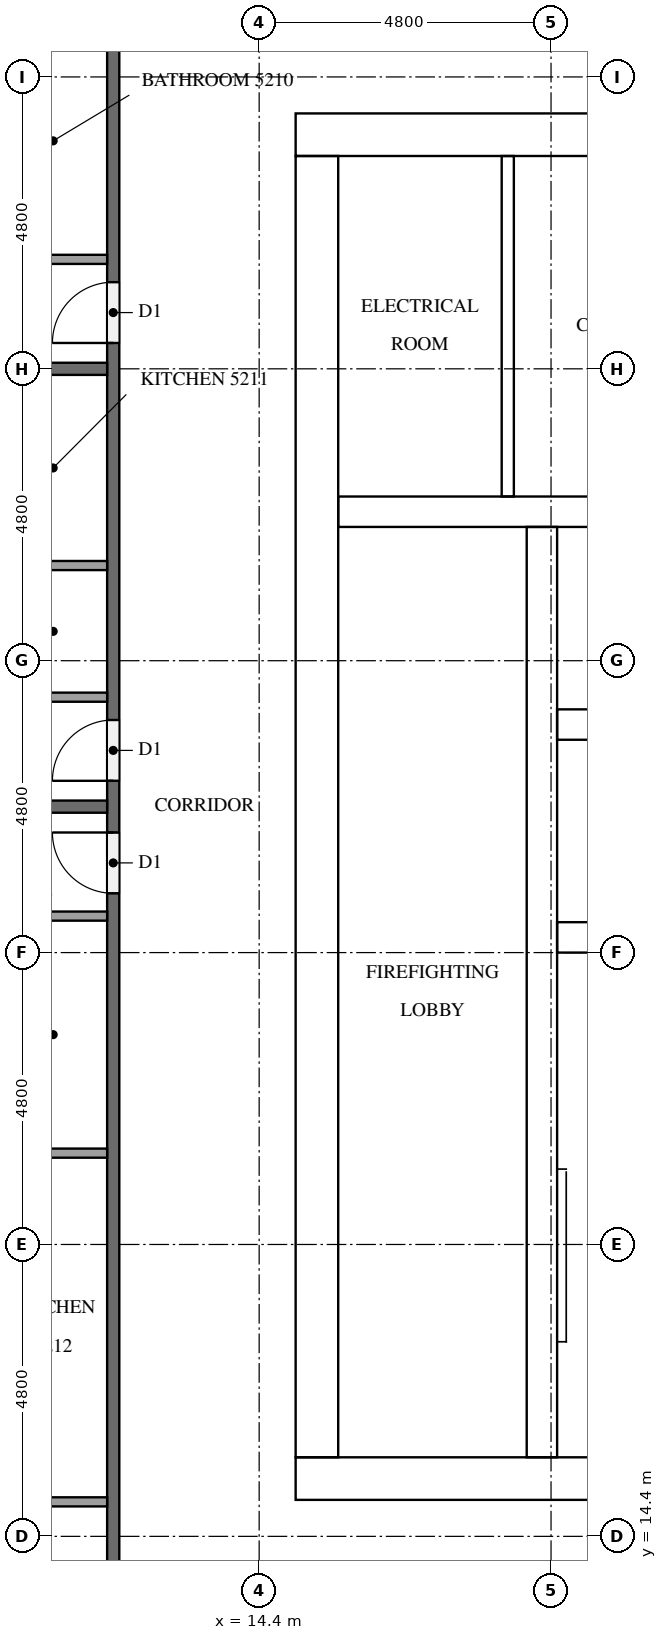
"""IFC4 building model, lengths in metres.
Left out: names, types, materials, properties, quantities, classifications, styles, units other than length and angle.
Written with IfcOpenShell. Run it as: python <this file> out.ifc"""

import sys

from ifc_helpers import new_model, si_unit, direction, frame, frame_2d, origin, place, context, subcontext, project, spatial, rectangle, extrude, element, fill, save


model = new_model("IFC4")
c1 = context("Model", 3, precision=1e-05, world=origin(), true_north=direction((0.0, 1.0)))
c2 = subcontext(c1, "Body", "Model", "MODEL_VIEW")
j1 = project(units=[si_unit("LENGTHUNIT", "METRE"), si_unit("PLANEANGLEUNIT", "RADIAN")], contexts=[c1])
p1 = place(None, origin())
s1 = spatial("IfcSite", under=j1, at=p1, CompositionType="ELEMENT")
p2 = place(p1, origin())
s2 = spatial("IfcBuilding", under=s1, at=p2, CompositionType="ELEMENT")
p3 = place(p2, frame((0.0, 0.0, 199.9)))
s3 = spatial("IfcBuildingStorey", under=s2, at=p3, CompositionType="ELEMENT", Elevation=199.9)
p4 = place(p3, frame((15.0, 15.35, 0.0), z_axis=(0.0, 0.0, 1.0), x_axis=(1.0, 0.0, 0.0)))
e1 = element("IfcWall", 1, at=p4, inside=s3, PredefinedType="SHEAR", context=c2, shape_type="SweptSolid", body=[
    extrude(rectangle(XDim=32.4, YDim=0.7, at=frame_2d((16.2, 0.0))), origin(), (0.0, 0.0, 1.0), 3.1),
])
p5 = place(p4, frame((15.3, 0.0, 0.0)))
e2 = element("IfcOpeningElement", 2, at=p5, cuts=e1, PredefinedType="OPENING", context=c2, shape_type="SweptSolid", body=[
    extrude(rectangle(XDim=1.8, YDim=2.1, at=frame_2d((0.9, 1.05))), frame((0.0, 0.36, 0.0), z_axis=(0.0, -1.0, 0.0), x_axis=(1.0, 0.0, 0.0)), (0.0, 0.0, 1.0), 0.72),
])
p6 = place(p3, frame((15.0, 37.45, 0.0), z_axis=(0.0, 0.0, 1.0), x_axis=(1.0, 0.0, 0.0)))
e3 = element("IfcWall", 3, at=p6, inside=s3, PredefinedType="SHEAR", context=c2, shape_type="SweptSolid", body=[
    extrude(rectangle(XDim=32.4, YDim=0.7, at=frame_2d((16.2, 0.0))), origin(), (0.0, 0.0, 1.0), 3.1),
])
p7 = place(p6, frame((15.3, 0.0, 0.0)))
e4 = element("IfcOpeningElement", 4, at=p7, cuts=e3, PredefinedType="OPENING", context=c2, shape_type="SweptSolid", body=[
    extrude(rectangle(XDim=1.8, YDim=2.1, at=frame_2d((0.9, 1.05))), frame((0.0, 0.36, 0.0), z_axis=(0.0, -1.0, 0.0), x_axis=(1.0, 0.0, 0.0)), (0.0, 0.0, 1.0), 0.72),
])
p8 = place(p6, frame((1.544, 0.0, 0.0)))
e5 = element("IfcOpeningElement", 5, at=p8, cuts=e3, PredefinedType="OPENING", context=c2, shape_type="SweptSolid", body=[
    extrude(rectangle(XDim=1.0, YDim=2.1, at=frame_2d((0.5, 1.05))), frame((0.0, 0.36, 0.0), z_axis=(0.0, -1.0, 0.0), x_axis=(1.0, 0.0, 0.0)), (0.0, 0.0, 1.0), 0.72),
])
p9 = place(p6, frame((5.219, 0.0, 0.0)))
e6 = element("IfcOpeningElement", 6, at=p9, cuts=e3, PredefinedType="OPENING", context=c2, shape_type="SweptSolid", body=[
    extrude(rectangle(XDim=1.0, YDim=2.1, at=frame_2d((0.5, 1.05))), frame((0.0, 0.36, 0.0), z_axis=(0.0, -1.0, 0.0), x_axis=(1.0, 0.0, 0.0)), (0.0, 0.0, 1.0), 0.72),
])
p10 = place(p3, frame((15.35, 15.7, 0.0), z_axis=(0.0, 0.0, 1.0), x_axis=(0.0, 1.0, 0.0)))
e7 = element("IfcWall", 7, at=p10, inside=s3, PredefinedType="SHEAR", context=c2, shape_type="SweptSolid", body=[
    extrude(rectangle(XDim=21.4, YDim=0.7, at=frame_2d((10.7, 0.0))), origin(), (0.0, 0.0, 1.0), 3.1),
])
p11 = place(p10, frame((5.06, 0.0, 0.0)))
e8 = element("IfcOpeningElement", 8, at=p11, cuts=e7, PredefinedType="OPENING", context=c2, shape_type="SweptSolid", body=[
    extrude(rectangle(XDim=1.2, YDim=2.1, at=frame_2d((0.6, 1.05))), frame((0.0, 0.36, 0.0), z_axis=(0.0, -1.0, 0.0), x_axis=(1.0, 0.0, 0.0)), (0.0, 0.0, 1.0), 0.72),
])
p12 = place(p3, frame((19.05, 15.7, 0.0), z_axis=(0.0, 0.0, 1.0), x_axis=(0.0, 1.0, 0.0)))
e9 = element("IfcWall", 9, at=p12, inside=s3, PredefinedType="SHEAR", context=c2, shape_type="SweptSolid", body=[
    extrude(rectangle(XDim=15.3, YDim=0.5, at=frame_2d((7.65, 0.0))), origin(), (0.0, 0.0, 1.0), 3.1),
])
p13 = place(p12, frame((9.75, 0.0, 0.0)))
e10 = element("IfcOpeningElement", 10, at=p13, cuts=e9, PredefinedType="OPENING", context=c2, shape_type="SweptSolid", body=[
    extrude(rectangle(XDim=1.1, YDim=2.1, at=frame_2d((0.55, 1.05))), frame((0.0, 0.26, 0.0), z_axis=(0.0, -1.0, 0.0), x_axis=(1.0, 0.0, 0.0)), (0.0, 0.0, 1.0), 0.52),
])
p14 = place(p12, frame((13.25, 0.0, 0.0)))
e11 = element("IfcOpeningElement", 11, at=p14, cuts=e9, PredefinedType="OPENING", context=c2, shape_type="SweptSolid", body=[
    extrude(rectangle(XDim=1.1, YDim=2.1, at=frame_2d((0.55, 1.05))), frame((0.0, 0.26, 0.0), z_axis=(0.0, -1.0, 0.0), x_axis=(1.0, 0.0, 0.0)), (0.0, 0.0, 1.0), 0.52),
])
p15 = place(p12, frame((0.5, 0.0, 0.0)))
e12 = element("IfcOpeningElement", 12, at=p15, cuts=e9, PredefinedType="OPENING", context=c2, shape_type="SweptSolid", body=[
    extrude(rectangle(XDim=1.2, YDim=2.1, at=frame_2d((0.6, 1.05))), frame((0.0, 0.26, 0.0), z_axis=(0.0, -1.0, 0.0), x_axis=(1.0, 0.0, 0.0)), (0.0, 0.0, 1.0), 0.52),
])
for number, where, z_axis, x_axis in (
    (13, (19.3, 24.25, 0.0), (0.0, 0.0, 1.0), (1.0, 0.0, 0.0)),
    (14, (19.3, 27.75, 0.0), (0.0, 0.0, 1.0), (1.0, 0.0, 0.0)),
):
    element("IfcWall", number, at=place(p3, frame(where, z_axis=z_axis, x_axis=x_axis)), inside=s3, PredefinedType="SHEAR", context=c2, shape_type="SweptSolid", body=[
        extrude(rectangle(XDim=3.55, YDim=0.5, at=frame_2d((1.775, 0.0))), origin(), (0.0, 0.0, 1.0), 3.1),
    ])
p16 = place(p3, frame((15.7, 31.25, 0.0), z_axis=(0.0, 0.0, 1.0), x_axis=(1.0, 0.0, 0.0)))
e15 = element("IfcWall", 15, at=p16, inside=s3, PredefinedType="SHEAR", context=c2, shape_type="SweptSolid", body=[
    extrude(rectangle(XDim=7.15, YDim=0.5, at=frame_2d((3.575, 0.0))), origin(), (0.0, 0.0, 1.0), 3.1),
])
p17 = place(p3, frame((18.489, 31.5, 0.0), z_axis=(0.0, 0.0, 1.0), x_axis=(0.0, 1.0, 0.0)))
e16 = element("IfcWall", 16, at=p17, inside=s3, PredefinedType="PARTITIONING", context=c2, shape_type="SweptSolid", body=[
    extrude(rectangle(XDim=5.6, YDim=0.2, at=frame_2d((2.8, 0.0))), origin(), (0.0, 0.0, 1.0), 3.1),
])
p18 = place(p3, frame((12.0, 12.1, 0.0), z_axis=(0.0, 0.0, 1.0), x_axis=(0.0, 1.0, 0.0)))
e17 = element("IfcWall", 17, at=p18, inside=s3, PredefinedType="PARTITIONING", context=c2, shape_type="SweptSolid", body=[
    extrude(rectangle(XDim=28.6, YDim=0.2, at=frame_2d((14.3, 0.0))), origin(), (0.0, 0.0, 1.0), 3.1),
])
p19 = place(p18, frame((21.925, 0.0, 0.0)))
e18 = element("IfcOpeningElement", 18, at=p19, cuts=e17, PredefinedType="OPENING", context=c2, shape_type="SweptSolid", body=[
    extrude(rectangle(XDim=1.0, YDim=2.1, at=frame_2d((0.5, 1.05))), frame((0.0, 0.11, 0.0), z_axis=(0.0, -1.0, 0.0), x_axis=(1.0, 0.0, 0.0)), (0.0, 0.0, 1.0), 0.22),
])
p20 = place(p18, frame((14.725, 0.0, 0.0)))
e19 = element("IfcOpeningElement", 19, at=p20, cuts=e17, PredefinedType="OPENING", context=c2, shape_type="SweptSolid", body=[
    extrude(rectangle(XDim=1.0, YDim=2.1, at=frame_2d((0.5, 1.05))), frame((0.0, 0.11, 0.0), z_axis=(0.0, -1.0, 0.0), x_axis=(1.0, 0.0, 0.0)), (0.0, 0.0, 1.0), 0.22),
])
p21 = place(p18, frame((12.875, 0.0, 0.0)))
e20 = element("IfcOpeningElement", 20, at=p21, cuts=e17, PredefinedType="OPENING", context=c2, shape_type="SweptSolid", body=[
    extrude(rectangle(XDim=1.0, YDim=2.1, at=frame_2d((0.5, 1.05))), frame((0.0, 0.11, 0.0), z_axis=(0.0, -1.0, 0.0), x_axis=(1.0, 0.0, 0.0)), (0.0, 0.0, 1.0), 0.22),
])
p22 = place(p3, frame((5.125, 33.6, 0.0), z_axis=(0.0, 0.0, 1.0), x_axis=(1.0, 0.0, 0.0)))
e21 = element("IfcWall", 21, at=p22, inside=s3, PredefinedType="PARTITIONING", context=c2, shape_type="SweptSolid", body=[
    extrude(rectangle(XDim=6.775, YDim=0.2, at=frame_2d((3.387, 0.0))), origin(), (0.0, 0.0, 1.0), 3.1),
])
p23 = place(p3, frame((4.9, 26.4, 0.0), z_axis=(0.0, 0.0, 1.0), x_axis=(1.0, 0.0, 0.0)))
e22 = element("IfcWall", 22, at=p23, inside=s3, PredefinedType="PARTITIONING", context=c2, shape_type="SweptSolid", body=[
    extrude(rectangle(XDim=7.0, YDim=0.2, at=frame_2d((3.5, 0.0))), origin(), (0.0, 0.0, 1.0), 3.1),
])
p24 = place(p3, frame((11.9, 35.4, 0.0), z_axis=(0.0, 0.0, 1.0), x_axis=(-1.0, 0.0, 0.0)))
e23 = element("IfcWall", 23, at=p24, inside=s3, PredefinedType="PARTITIONING", context=c2, shape_type="SweptSolid", body=[
    extrude(rectangle(XDim=1.925, YDim=0.15, at=frame_2d((0.962, 0.0))), origin(), (0.0, 0.0, 1.0), 3.1),
])
p25 = place(p3, frame((11.9, 30.365, 0.0), z_axis=(0.0, 0.0, 1.0), x_axis=(-1.0, 0.0, 0.0)))
e24 = element("IfcWall", 24, at=p25, inside=s3, PredefinedType="PARTITIONING", context=c2, shape_type="SweptSolid", body=[
    extrude(rectangle(XDim=1.775, YDim=0.15, at=frame_2d((0.887, 0.0))), origin(), (0.0, 0.0, 1.0), 3.1),
])
p26 = place(p3, frame((11.9, 28.2, 0.0), z_axis=(0.0, 0.0, 1.0), x_axis=(-1.0, 0.0, 0.0)))
e25 = element("IfcWall", 25, at=p26, inside=s3, PredefinedType="PARTITIONING", context=c2, shape_type="SweptSolid", body=[
    extrude(rectangle(XDim=1.925, YDim=0.15, at=frame_2d((0.962, 0.0))), origin(), (0.0, 0.0, 1.0), 3.1),
])
for number, where, z_axis, x_axis in (
    (26, (11.9, 20.702, 0.0), (0.0, 0.0, 1.0), (-1.0, 0.0, 0.0)),
    (27, (11.9, 14.967, 0.0), (0.0, 0.0, 1.0), (-1.0, 0.0, 0.0)),
):
    element("IfcWall", number, at=place(p3, frame(where, z_axis=z_axis, x_axis=x_axis)), inside=s3, PredefinedType="PARTITIONING", context=c2, shape_type="SweptSolid", body=[
        extrude(rectangle(XDim=1.775, YDim=0.15, at=frame_2d((0.887, 0.0))), origin(), (0.0, 0.0, 1.0), 3.1),
    ])
p27 = place(p3, frame((11.9, 24.6, 0.0), z_axis=(0.0, 0.0, 1.0), x_axis=(-1.0, 0.0, 0.0)))
e28 = element("IfcWall", 28, at=p27, inside=s3, PredefinedType="PARTITIONING", context=c2, shape_type="SweptSolid", body=[
    extrude(rectangle(XDim=1.925, YDim=0.15, at=frame_2d((0.962, 0.0))), origin(), (0.0, 0.0, 1.0), 3.1),
])
p28 = place(p13, origin())
e29 = element("IfcDoor", 29, at=p28, inside=s3, OperationType="DOUBLE_DOOR_SLIDING", PredefinedType="DOOR", context=c2, shape_type="SweptSolid", body=[
    extrude(rectangle(XDim=1.1, YDim=2.1, at=frame_2d((0.55, 1.05))), frame((0.0, 0.025, 0.0), z_axis=(0.0, -1.0, 0.0), x_axis=(1.0, 0.0, 0.0)), (0.0, 0.0, 1.0), 0.05),
])
fill(e10, e29)
p29 = place(p14, origin())
e30 = element("IfcDoor", 30, at=p29, inside=s3, OperationType="DOUBLE_DOOR_SLIDING", PredefinedType="DOOR", context=c2, shape_type="SweptSolid", body=[
    extrude(rectangle(XDim=1.1, YDim=2.1, at=frame_2d((0.55, 1.05))), frame((0.0, 0.025, 0.0), z_axis=(0.0, -1.0, 0.0), x_axis=(1.0, 0.0, 0.0)), (0.0, 0.0, 1.0), 0.05),
])
fill(e11, e30)
p30 = place(p15, frame((1.2, 0.0, 0.0), z_axis=(0.0, 0.0, 1.0), x_axis=(-1.0, 0.0, 0.0)))
e31 = element("IfcDoor", 31, at=p30, inside=s3, OperationType="SINGLE_SWING_RIGHT", PredefinedType="DOOR", context=c2, shape_type="SweptSolid", body=[
    extrude(rectangle(XDim=1.2, YDim=2.1, at=frame_2d((0.6, 1.05))), frame((0.0, 0.025, 0.0), z_axis=(0.0, -1.0, 0.0), x_axis=(1.0, 0.0, 0.0)), (0.0, 0.0, 1.0), 0.05),
])
fill(e12, e31)
p31 = place(p11, frame((1.2, 0.0, 0.0), z_axis=(0.0, 0.0, 1.0), x_axis=(-1.0, 0.0, 0.0)))
e32 = element("IfcDoor", 32, at=p31, inside=s3, OperationType="SINGLE_SWING_LEFT", PredefinedType="DOOR", context=c2, shape_type="SweptSolid", body=[
    extrude(rectangle(XDim=1.2, YDim=2.1, at=frame_2d((0.6, 1.05))), frame((0.0, 0.025, 0.0), z_axis=(0.0, -1.0, 0.0), x_axis=(1.0, 0.0, 0.0)), (0.0, 0.0, 1.0), 0.05),
])
fill(e8, e32)
p32 = place(p8, origin())
e33 = element("IfcDoor", 33, at=p32, inside=s3, OperationType="SINGLE_SWING_LEFT", PredefinedType="DOOR", context=c2, shape_type="SweptSolid", body=[
    extrude(rectangle(XDim=1.0, YDim=2.1, at=frame_2d((0.5, 1.05))), frame((0.0, 0.025, 0.0), z_axis=(0.0, -1.0, 0.0), x_axis=(1.0, 0.0, 0.0)), (0.0, 0.0, 1.0), 0.05),
])
fill(e5, e33)
p33 = place(p19, origin())
e34 = element("IfcDoor", 34, at=p33, inside=s3, OperationType="SINGLE_SWING_LEFT", PredefinedType="DOOR", context=c2, shape_type="SweptSolid", body=[
    extrude(rectangle(XDim=1.0, YDim=2.1, at=frame_2d((0.5, 1.05))), frame((0.0, 0.025, 0.0), z_axis=(0.0, -1.0, 0.0), x_axis=(1.0, 0.0, 0.0)), (0.0, 0.0, 1.0), 0.05),
])
fill(e18, e34)
p34 = place(p20, origin())
e35 = element("IfcDoor", 35, at=p34, inside=s3, OperationType="SINGLE_SWING_LEFT", PredefinedType="DOOR", context=c2, shape_type="SweptSolid", body=[
    extrude(rectangle(XDim=1.0, YDim=2.1, at=frame_2d((0.5, 1.05))), frame((0.0, 0.025, 0.0), z_axis=(0.0, -1.0, 0.0), x_axis=(1.0, 0.0, 0.0)), (0.0, 0.0, 1.0), 0.05),
])
fill(e19, e35)
p35 = place(p21, origin())
e36 = element("IfcDoor", 36, at=p35, inside=s3, OperationType="SINGLE_SWING_RIGHT", PredefinedType="DOOR", context=c2, shape_type="SweptSolid", body=[
    extrude(rectangle(XDim=1.0, YDim=2.1, at=frame_2d((0.5, 1.05))), frame((0.0, 0.025, 0.0), z_axis=(0.0, -1.0, 0.0), x_axis=(1.0, 0.0, 0.0)), (0.0, 0.0, 1.0), 0.05),
])
fill(e20, e36)
save(model, sys.argv[1])
